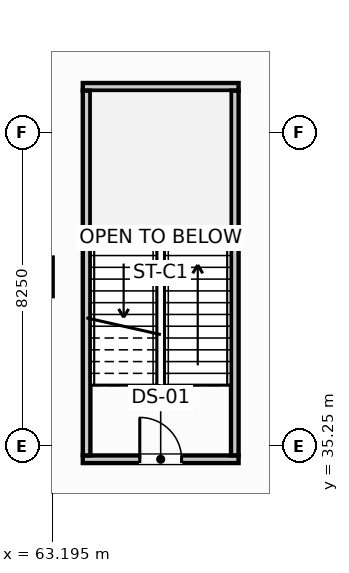
"""IFC4 building model, lengths in metres.
Left out: names, types, materials, properties, quantities, classifications, styles, units other than length and angle.
Written with IfcOpenShell. Run it as: python <this file> out.ifc"""

import sys

from ifc_helpers import new_model, si_unit, direction, frame, frame_2d, origin, origin_2d, place, context, subcontext, project, spatial, rectangle, extrude, element, fill, save


model = new_model("IFC4")
c1 = context("Model", 3, precision=1e-05, world=origin(), true_north=direction((0.0, 1.0)))
c2 = subcontext(c1, "Body", "Model", "MODEL_VIEW")
j1 = project(units=[si_unit("LENGTHUNIT", "METRE"), si_unit("PLANEANGLEUNIT", "RADIAN")], contexts=[c1])
p1 = place(None, origin())
s1 = spatial("IfcSite", under=j1, at=p1, CompositionType="ELEMENT")
p2 = place(p1, origin())
s2 = spatial("IfcBuilding", under=s1, at=p2, CompositionType="ELEMENT")
p3 = place(p2, frame((0.0, 0.0, -4.5)))
s3 = spatial("IfcBuildingStorey", under=s2, at=p3, CompositionType="ELEMENT", Elevation=-4.5)
p4 = place(p3, frame((62.7, 39.7, -0.32), z_axis=(0.0, 0.0, 1.0), x_axis=(1.0, 0.0, 0.0)))
e1 = element("IfcColumn", 1, at=p4, inside=s3, PredefinedType="COLUMN", context=c2, shape_type="SweptSolid", body=[
    extrude(rectangle(XDim=1.05, YDim=1.05, at=origin_2d()), origin(), (0.0, 0.0, 1.0), 4.46),
])
p5 = place(p3, frame((64.0, 34.9, -0.32), z_axis=(0.0, 0.0, 1.0), x_axis=(1.0, 0.0, 0.0)))
e2 = element("IfcWall", 2, at=p5, inside=s3, PredefinedType="SHEAR", context=c2, shape_type="SweptSolid", body=[
    extrude(rectangle(XDim=4.1, YDim=0.2, at=frame_2d((2.05, 0.0))), origin(), (0.0, 0.0, 1.0), 4.46),
])
p6 = place(p5, frame((1.5, 0.0, 0.32)))
e3 = element("IfcOpeningElement", 3, at=p6, cuts=e2, PredefinedType="OPENING", context=c2, shape_type="SweptSolid", body=[
    extrude(rectangle(XDim=1.1, YDim=2.15, at=frame_2d((0.55, 1.075))), frame((0.0, 0.11, 0.0), z_axis=(0.0, -1.0, 0.0), x_axis=(1.0, 0.0, 0.0)), (0.0, 0.0, 1.0), 0.22),
])
p7 = place(p3, frame((64.0, 44.7, -0.32), z_axis=(0.0, 0.0, 1.0), x_axis=(1.0, 0.0, 0.0)))
e4 = element("IfcWall", 4, at=p7, inside=s3, PredefinedType="SHEAR", context=c2, shape_type="SweptSolid", body=[
    extrude(rectangle(XDim=4.1, YDim=0.2, at=frame_2d((2.05, 0.0))), origin(), (0.0, 0.0, 1.0), 4.46),
])
for number, where, z_axis, x_axis in (
    (5, (64.1, 35.002, -0.32), (0.0, 0.0, 1.0), (0.0, 1.0, 0.0)),
    (6, (68.0, 35.002, -0.32), (0.0, 0.0, 1.0), (0.0, 1.0, 0.0)),
):
    element("IfcWall", number, at=place(p3, frame(where, z_axis=z_axis, x_axis=x_axis)), inside=s3, PredefinedType="SHEAR", context=c2, shape_type="SweptSolid", body=[
        extrude(rectangle(XDim=9.596, YDim=0.2, at=frame_2d((4.798, 0.0))), origin(), (0.0, 0.0, 1.0), 4.46),
    ])
p8 = place(p6, origin())
e7 = element("IfcDoor", 7, at=p8, inside=s3, OperationType="SINGLE_SWING_LEFT", PredefinedType="DOOR", context=c2, shape_type="SweptSolid", body=[
    extrude(rectangle(XDim=1.1, YDim=2.15, at=frame_2d((0.55, 1.075))), frame((0.0, 0.025, 0.0), z_axis=(0.0, -1.0, 0.0), x_axis=(1.0, 0.0, 0.0)), (0.0, 0.0, 1.0), 0.05),
])
fill(e3, e7)
save(model, sys.argv[1])
